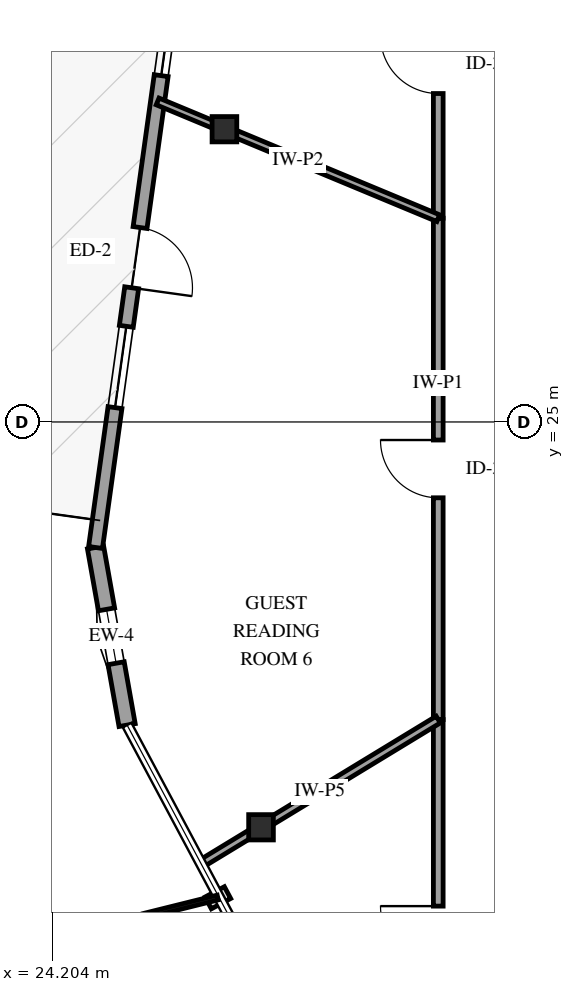
"""IFC4 building model, lengths in metres.
Left out: names, types, materials, properties, quantities, classifications, styles, units other than length and angle.
Written with IfcOpenShell. Run it as: python <this file> out.ifc"""

import sys

from ifc_helpers import new_model, si_unit, direction, frame, frame_2d, origin, origin_2d, place, context, subcontext, project, spatial, rectangle, i_section, extrude, element, fill, save


model = new_model("IFC4")
c1 = context("Model", 3, precision=1e-05, world=origin(), true_north=direction((0.0, 1.0)))
c2 = subcontext(c1, "Body", "Model", "MODEL_VIEW")
j1 = project(units=[si_unit("LENGTHUNIT", "METRE"), si_unit("PLANEANGLEUNIT", "RADIAN")], contexts=[c1])
p1 = place(None, origin())
s1 = spatial("IfcSite", under=j1, at=p1, CompositionType="ELEMENT")
p2 = place(p1, origin())
s2 = spatial("IfcBuilding", under=s1, at=p2, CompositionType="ELEMENT")
p3 = place(p2, frame((0.0, 0.0, 205.0)))
s3 = spatial("IfcBuildingStorey", under=s2, at=p3, CompositionType="ELEMENT", Elevation=205.0)
for number, where, z_axis, x_axis in (
    (1, (27.034, 29.814, 0.0), (0.0, 0.0, 1.0), (1.0, 0.0, 0.0)),
    (2, (27.635, 18.334, 0.0), (0.0, 0.0, 1.0), (1.0, 0.0, 0.0)),
):
    element("IfcColumn", number, at=place(p3, frame(where, z_axis=z_axis, x_axis=x_axis)), inside=s3, PredefinedType="COLUMN", context=c2, shape_type="SweptSolid", body=[
        extrude(i_section(OverallWidth=0.406, OverallDepth=0.416, WebThickness=0.03, FlangeThickness=0.048, FilletRadius=0.038, at=origin_2d()), origin(), (0.0, 0.0, 1.0), 3.6),
    ])
p4 = place(p3, frame((24.914, 22.936, 0.0), z_axis=(0.0, 0.0, 1.0), x_axis=(0.175052836201, -0.984559040656, 0.0)))
e3 = element("IfcWall", 3, at=p4, inside=s3, PredefinedType="SOLIDWALL", context=c2, shape_type="SweptSolid", body=[
    extrude(rectangle(XDim=2.967, YDim=0.27, at=frame_2d((1.483, 0.0))), origin(), (0.0, 0.0, 1.0), 2.679),
])
p5 = place(p4, frame((1.033, 0.0, 0.75)))
e4 = element("IfcOpeningElement", 4, at=p5, cuts=e3, PredefinedType="OPENING", context=c2, shape_type="SweptSolid", body=[
    extrude(rectangle(XDim=0.9, YDim=1.5, at=frame_2d((0.45, 0.75))), frame((0.0, 0.145, 0.0), z_axis=(0.0, -1.0, 0.0), x_axis=(1.0, 0.0, 0.0)), (0.0, 0.0, 1.0), 0.29),
])
p6 = place(p3, frame((26.24, 32.468, 0.0), z_axis=(0.0, 0.0, 1.0), x_axis=(-0.137794425401, -0.990460850477, 0.0)))
e5 = element("IfcWall", 5, at=p6, inside=s3, PredefinedType="SOLIDWALL", context=c2, shape_type="SweptSolid", body=[
    extrude(rectangle(XDim=9.624, YDim=0.23, at=frame_2d((4.812, 0.0))), origin(), (0.0, 0.0, 1.0), 2.679),
])
p7 = place(p6, frame((4.312, 0.0, 0.0)))
e6 = element("IfcOpeningElement", 6, at=p7, cuts=e5, PredefinedType="OPENING", context=c2, shape_type="SweptSolid", body=[
    extrude(rectangle(XDim=1.0, YDim=2.15, at=frame_2d((0.5, 1.075))), frame((0.0, 0.125, 0.0), z_axis=(0.0, -1.0, 0.0), x_axis=(1.0, 0.0, 0.0)), (0.0, 0.0, 1.0), 0.25),
])
p8 = place(p6, frame((0.44, 0.0, 0.72)))
e7 = element("IfcOpeningElement", 7, at=p8, cuts=e5, PredefinedType="OPENING", context=c2, shape_type="SweptSolid", body=[
    extrude(rectangle(XDim=1.35, YDim=1.65, at=frame_2d((0.675, 0.825))), frame((0.0, 0.125, 0.0), z_axis=(0.0, -1.0, 0.0), x_axis=(1.0, 0.0, 0.0)), (0.0, 0.0, 1.0), 0.25),
])
p9 = place(p6, frame((5.952, 0.0, 0.72)))
e8 = element("IfcOpeningElement", 8, at=p9, cuts=e5, PredefinedType="OPENING", context=c2, shape_type="SweptSolid", body=[
    extrude(rectangle(XDim=1.35, YDim=1.65, at=frame_2d((0.675, 0.825))), frame((0.0, 0.125, 0.0), z_axis=(0.0, -1.0, 0.0), x_axis=(1.0, 0.0, 0.0)), (0.0, 0.0, 1.0), 0.25),
])
p10 = place(p3, frame((30.55, 20.106, 0.0), z_axis=(0.0, 0.0, 1.0), x_axis=(0.0, 1.0, 0.0)))
e9 = element("IfcWall", 9, at=p10, inside=s3, PredefinedType="PARTITIONING", context=c2, shape_type="SweptSolid", body=[
    extrude(rectangle(XDim=8.245, YDim=0.16, at=frame_2d((4.123, 0.0))), origin(), (0.0, 0.0, 1.0), 3.3),
])
p11 = place(p10, frame((3.647, 0.0, 0.0)))
e10 = element("IfcOpeningElement", 10, at=p11, cuts=e9, PredefinedType="OPENING", context=c2, shape_type="SweptSolid", body=[
    extrude(rectangle(XDim=0.95, YDim=2.15, at=frame_2d((0.475, 1.075))), frame((0.0, 0.09, 0.0), z_axis=(0.0, -1.0, 0.0), x_axis=(1.0, 0.0, 0.0)), (0.0, 0.0, 1.0), 0.18),
])
p12 = place(p3, frame((30.55, 13.02, 0.0), z_axis=(0.0, 0.0, 1.0), x_axis=(0.0, 1.0, 0.0)))
e11 = element("IfcWall", 11, at=p12, inside=s3, PredefinedType="PARTITIONING", context=c2, shape_type="SweptSolid", body=[
    extrude(rectangle(XDim=7.086, YDim=0.16, at=frame_2d((3.543, 0.0))), origin(), (0.0, 0.0, 1.0), 3.3),
])
p13 = place(p12, frame((3.068, 0.0, 0.0)))
e12 = element("IfcOpeningElement", 12, at=p13, cuts=e11, PredefinedType="OPENING", context=c2, shape_type="SweptSolid", body=[
    extrude(rectangle(XDim=0.95, YDim=2.15, at=frame_2d((0.475, 1.075))), frame((0.0, 0.09, 0.0), z_axis=(0.0, -1.0, 0.0), x_axis=(1.0, 0.0, 0.0)), (0.0, 0.0, 1.0), 0.18),
])
p14 = place(p3, frame((30.55, 28.351, 0.0), z_axis=(0.0, 0.0, 1.0), x_axis=(0.0, 1.0, 0.0)))
e13 = element("IfcWall", 13, at=p14, inside=s3, PredefinedType="PARTITIONING", context=c2, shape_type="SweptSolid", body=[
    extrude(rectangle(XDim=5.05, YDim=0.16, at=frame_2d((2.525, 0.0))), origin(), (0.0, 0.0, 1.0), 3.3),
])
p15 = place(p14, frame((2.05, 0.0, 0.0)))
e14 = element("IfcOpeningElement", 14, at=p15, cuts=e13, PredefinedType="OPENING", context=c2, shape_type="SweptSolid", body=[
    extrude(rectangle(XDim=0.95, YDim=2.15, at=frame_2d((0.475, 1.075))), frame((0.0, 0.09, 0.0), z_axis=(0.0, -1.0, 0.0), x_axis=(1.0, 0.0, 0.0)), (0.0, 0.0, 1.0), 0.18),
])
p16 = place(p3, frame((30.55, 28.351, 0.0), z_axis=(0.0, 0.0, 1.0), x_axis=(-0.923289208282, 0.384105503567, 0.0)))
e15 = element("IfcWall", 15, at=p16, inside=s3, PredefinedType="PARTITIONING", context=c2, shape_type="SweptSolid", body=[
    extrude(rectangle(XDim=4.999, YDim=0.12, at=frame_2d((2.499, 0.0))), origin(), (0.0, 0.0, 1.0), 3.3),
])
p17 = place(p3, frame((30.55, 20.106, 0.0), z_axis=(0.0, 0.0, 1.0), x_axis=(-0.85450518218, -0.519442868492, 0.0)))
e16 = element("IfcWall", 16, at=p17, inside=s3, PredefinedType="PARTITIONING", context=c2, shape_type="SweptSolid", body=[
    extrude(rectangle(XDim=4.564, YDim=0.13, at=frame_2d((2.282, 0.0))), origin(), (0.0, 0.0, 1.0), 3.3),
])
p18 = place(p5, origin())
e17 = element("IfcWindow", 17, at=p18, inside=s3, PartitioningType="SINGLE_PANEL", PredefinedType="WINDOW", context=c2, shape_type="SweptSolid", body=[
    extrude(rectangle(XDim=0.9, YDim=1.5, at=frame_2d((0.45, 0.75))), frame((0.0, 0.03, 0.0), z_axis=(0.0, -1.0, 0.0), x_axis=(1.0, 0.0, 0.0)), (0.0, 0.0, 1.0), 0.06),
])
fill(e4, e17)
p19 = place(p7, origin())
e18 = element("IfcDoor", 18, at=p19, inside=s3, OperationType="SINGLE_SWING_RIGHT", PredefinedType="DOOR", context=c2, shape_type="SweptSolid", body=[
    extrude(rectangle(XDim=1.0, YDim=2.15, at=frame_2d((0.5, 1.075))), frame((0.0, 0.025, 0.0), z_axis=(0.0, -1.0, 0.0), x_axis=(1.0, 0.0, 0.0)), (0.0, 0.0, 1.0), 0.05),
])
fill(e6, e18)
p20 = place(p8, origin())
e19 = element("IfcWindow", 19, at=p20, inside=s3, PartitioningType="SINGLE_PANEL", PredefinedType="WINDOW", context=c2, shape_type="SweptSolid", body=[
    extrude(rectangle(XDim=1.35, YDim=1.65, at=frame_2d((0.675, 0.825))), frame((0.0, 0.03, 0.0), z_axis=(0.0, -1.0, 0.0), x_axis=(1.0, 0.0, 0.0)), (0.0, 0.0, 1.0), 0.06),
])
fill(e7, e19)
p21 = place(p9, origin())
e20 = element("IfcWindow", 20, at=p21, inside=s3, PartitioningType="SINGLE_PANEL", PredefinedType="WINDOW", context=c2, shape_type="SweptSolid", body=[
    extrude(rectangle(XDim=1.35, YDim=1.65, at=frame_2d((0.675, 0.825))), frame((0.0, 0.03, 0.0), z_axis=(0.0, -1.0, 0.0), x_axis=(1.0, 0.0, 0.0)), (0.0, 0.0, 1.0), 0.06),
])
fill(e8, e20)
p22 = place(p11, origin())
e21 = element("IfcDoor", 21, at=p22, inside=s3, OperationType="SINGLE_SWING_RIGHT", PredefinedType="DOOR", context=c2, shape_type="SweptSolid", body=[
    extrude(rectangle(XDim=0.95, YDim=2.15, at=frame_2d((0.475, 1.075))), frame((0.0, 0.025, 0.0), z_axis=(0.0, -1.0, 0.0), x_axis=(1.0, 0.0, 0.0)), (0.0, 0.0, 1.0), 0.05),
])
fill(e10, e21)
p23 = place(p13, origin())
e22 = element("IfcDoor", 22, at=p23, inside=s3, OperationType="SINGLE_SWING_RIGHT", PredefinedType="DOOR", context=c2, shape_type="SweptSolid", body=[
    extrude(rectangle(XDim=0.95, YDim=2.15, at=frame_2d((0.475, 1.075))), frame((0.0, 0.025, 0.0), z_axis=(0.0, -1.0, 0.0), x_axis=(1.0, 0.0, 0.0)), (0.0, 0.0, 1.0), 0.05),
])
fill(e12, e22)
p24 = place(p15, origin())
e23 = element("IfcDoor", 23, at=p24, inside=s3, OperationType="SINGLE_SWING_RIGHT", PredefinedType="DOOR", context=c2, shape_type="SweptSolid", body=[
    extrude(rectangle(XDim=0.95, YDim=2.15, at=frame_2d((0.475, 1.075))), frame((0.0, 0.025, 0.0), z_axis=(0.0, -1.0, 0.0), x_axis=(1.0, 0.0, 0.0)), (0.0, 0.0, 1.0), 0.05),
])
fill(e14, e23)
save(model, sys.argv[1])
